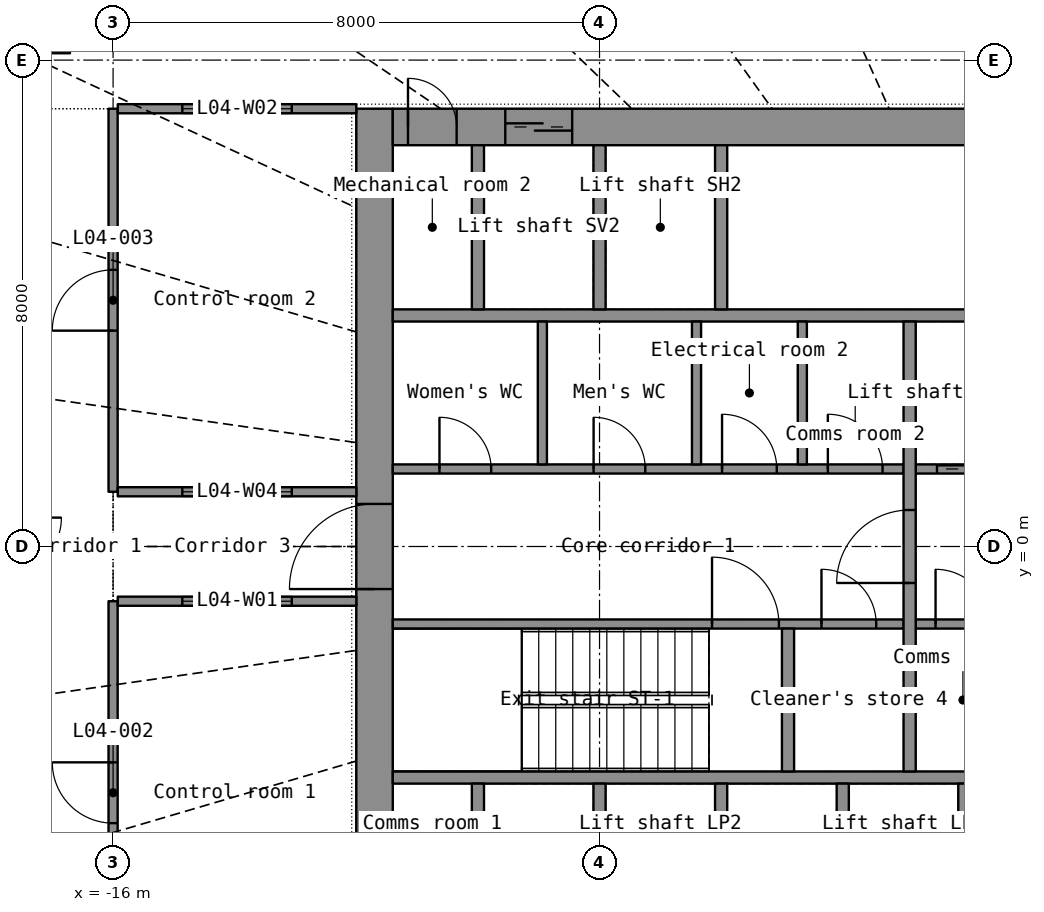
"""IFC4 building model, lengths in metres.
Left out: names, types, materials, properties, quantities, classifications, styles, units other than length and angle.
Written with IfcOpenShell. Run it as: python <this file> out.ifc"""

import sys

from ifc_helpers import new_model, si_unit, direction, frame, frame_2d, origin, place, context, subcontext, project, spatial, rectangle, extrude, element, fill, save


model = new_model("IFC4")
c1 = context("Model", 3, precision=1e-05, world=origin(), true_north=direction((0.0, 1.0)))
c2 = subcontext(c1, "Body", "Model", "MODEL_VIEW")
j1 = project(units=[si_unit("LENGTHUNIT", "METRE"), si_unit("PLANEANGLEUNIT", "RADIAN")], contexts=[c1])
p1 = place(None, origin())
s1 = spatial("IfcSite", under=j1, at=p1, CompositionType="ELEMENT")
p2 = place(p1, origin())
s2 = spatial("IfcBuilding", under=s1, at=p2, CompositionType="ELEMENT")
p3 = place(p2, frame((0.0, 0.0, 24.5)))
s3 = spatial("IfcBuildingStorey", under=s2, at=p3, CompositionType="ELEMENT", Elevation=24.5)
p4 = place(p3, frame((-11.7, -7.2, 0.0), z_axis=(0.0, 0.0, 1.0), x_axis=(0.0, 1.0, 0.0)))
e1 = element("IfcWall", 1, at=p4, inside=s3, PredefinedType="SHEAR", context=c2, shape_type="SweptSolid", body=[
    extrude(rectangle(XDim=14.4, YDim=0.6, at=frame_2d((7.2, 0.0))), origin(), (0.0, 0.0, 1.0), 3.8),
])
p5 = place(p4, frame((6.5, 0.0, 0.0)))
e2 = element("IfcOpeningElement", 2, at=p5, cuts=e1, PredefinedType="OPENING", context=c2, shape_type="SweptSolid", body=[
    extrude(rectangle(XDim=1.4, YDim=2.2, at=frame_2d((0.7, 1.1))), frame((0.0, 0.31, 0.0), z_axis=(0.0, -1.0, 0.0), x_axis=(1.0, 0.0, 0.0)), (0.0, 0.0, 1.0), 0.62),
])
p6 = place(p3, frame((-11.4, 6.9, 0.0), z_axis=(0.0, 0.0, 1.0), x_axis=(1.0, 0.0, 0.0)))
e3 = element("IfcWall", 3, at=p6, inside=s3, PredefinedType="SHEAR", context=c2, shape_type="SweptSolid", body=[
    extrude(rectangle(XDim=22.8, YDim=0.6, at=frame_2d((11.4, 0.0))), origin(), (0.0, 0.0, 1.0), 3.8),
])
p7 = place(p6, frame((1.85, 0.0, 0.0)))
e4 = element("IfcOpeningElement", 4, at=p7, cuts=e3, PredefinedType="OPENING", context=c2, shape_type="SweptSolid", body=[
    extrude(rectangle(XDim=1.1, YDim=2.2, at=frame_2d((0.55, 1.1))), frame((0.0, 0.31, 0.0), z_axis=(0.0, -1.0, 0.0), x_axis=(1.0, 0.0, 0.0)), (0.0, 0.0, 1.0), 0.62),
])
p8 = place(p6, frame((9.95, 0.0, 0.0)))
e5 = element("IfcOpeningElement", 5, at=p8, cuts=e3, PredefinedType="OPENING", context=c2, shape_type="SweptSolid", body=[
    extrude(rectangle(XDim=0.9, YDim=2.1, at=frame_2d((0.45, 1.05))), frame((0.0, 0.31, 0.0), z_axis=(0.0, -1.0, 0.0), x_axis=(1.0, 0.0, 0.0)), (0.0, 0.0, 1.0), 0.62),
])
p9 = place(p6, frame((17.95, 0.0, 0.0)))
e6 = element("IfcOpeningElement", 6, at=p9, cuts=e3, PredefinedType="OPENING", context=c2, shape_type="SweptSolid", body=[
    extrude(rectangle(XDim=0.9, YDim=2.1, at=frame_2d((0.45, 1.05))), frame((0.0, 0.31, 0.0), z_axis=(0.0, -1.0, 0.0), x_axis=(1.0, 0.0, 0.0)), (0.0, 0.0, 1.0), 0.62),
])
p10 = place(p6, frame((0.25, 0.0, 0.0)))
e7 = element("IfcOpeningElement", 7, at=p10, cuts=e3, PredefinedType="OPENING", context=c2, shape_type="SweptSolid", body=[
    extrude(rectangle(XDim=0.8, YDim=2.05, at=frame_2d((0.4, 1.025))), frame((0.0, 0.31, 0.0), z_axis=(0.0, -1.0, 0.0), x_axis=(1.0, 0.0, 0.0)), (0.0, 0.0, 1.0), 0.62),
])
p11 = place(p6, frame((21.75, 0.0, 0.0)))
e8 = element("IfcOpeningElement", 8, at=p11, cuts=e3, PredefinedType="OPENING", context=c2, shape_type="SweptSolid", body=[
    extrude(rectangle(XDim=0.8, YDim=2.05, at=frame_2d((0.4, 1.025))), frame((0.0, 0.31, 0.0), z_axis=(0.0, -1.0, 0.0), x_axis=(1.0, 0.0, 0.0)), (0.0, 0.0, 1.0), 0.62),
])
for number, where, z_axis, x_axis in (
    (9, (-11.4, -3.8, 0.0), (0.0, 0.0, 1.0), (1.0, 0.0, 0.0)),
    (10, (-11.4, 3.8, 0.0), (0.0, 0.0, 1.0), (1.0, 0.0, 0.0)),
):
    element("IfcWall", number, at=place(p3, frame(where, z_axis=z_axis, x_axis=x_axis)), inside=s3, PredefinedType="SHEAR", context=c2, shape_type="SweptSolid", body=[
        extrude(rectangle(XDim=22.8, YDim=0.2, at=frame_2d((11.4, 0.0))), origin(), (0.0, 0.0, 1.0), 3.8),
    ])
for number, where, z_axis, x_axis in (
    (11, (-10.0, -6.6, 0.0), (0.0, 0.0, 1.0), (0.0, 1.0, 0.0)),
    (12, (-8.0, -6.6, 0.0), (0.0, 0.0, 1.0), (0.0, 1.0, 0.0)),
    (13, (-6.0, -6.6, 0.0), (0.0, 0.0, 1.0), (0.0, 1.0, 0.0)),
    (14, (-4.0, -6.6, 0.0), (0.0, 0.0, 1.0), (0.0, 1.0, 0.0)),
    (15, (-2.0, -6.6, 0.0), (0.0, 0.0, 1.0), (0.0, 1.0, 0.0)),
    (16, (-10.0, 3.9, 0.0), (0.0, 0.0, 1.0), (0.0, 1.0, 0.0)),
    (17, (-8.0, 3.9, 0.0), (0.0, 0.0, 1.0), (0.0, 1.0, 0.0)),
    (18, (-6.0, 3.9, 0.0), (0.0, 0.0, 1.0), (0.0, 1.0, 0.0)),
):
    element("IfcWall", number, at=place(p3, frame(where, z_axis=z_axis, x_axis=x_axis)), inside=s3, PredefinedType="SHEAR", context=c2, shape_type="SweptSolid", body=[
        extrude(rectangle(XDim=2.7, YDim=0.2, at=frame_2d((1.35, 0.0))), origin(), (0.0, 0.0, 1.0), 3.8),
    ])
p12 = place(p3, frame((-11.4, -1.275, 0.0), z_axis=(0.0, 0.0, 1.0), x_axis=(1.0, 0.0, 0.0)))
e19 = element("IfcWall", 19, at=p12, inside=s3, PredefinedType="SHEAR", context=c2, shape_type="SweptSolid", body=[
    extrude(rectangle(XDim=8.4, YDim=0.15, at=frame_2d((4.2, 0.0))), origin(), (0.0, 0.0, 1.0), 3.8),
])
p13 = place(p12, frame((5.25, 0.0, 0.0)))
e20 = element("IfcOpeningElement", 20, at=p13, cuts=e19, PredefinedType="OPENING", context=c2, shape_type="SweptSolid", body=[
    extrude(rectangle(XDim=1.1, YDim=2.15, at=frame_2d((0.55, 1.075))), frame((0.0, 0.085, 0.0), z_axis=(0.0, -1.0, 0.0), x_axis=(1.0, 0.0, 0.0)), (0.0, 0.0, 1.0), 0.17),
])
p14 = place(p12, frame((7.05, 0.0, 0.0)))
e21 = element("IfcOpeningElement", 21, at=p14, cuts=e19, PredefinedType="OPENING", context=c2, shape_type="SweptSolid", body=[
    extrude(rectangle(XDim=0.9, YDim=2.1, at=frame_2d((0.45, 1.05))), frame((0.0, 0.085, 0.0), z_axis=(0.0, -1.0, 0.0), x_axis=(1.0, 0.0, 0.0)), (0.0, 0.0, 1.0), 0.17),
])
p15 = place(p3, frame((-2.8, -1.275, 0.0), z_axis=(0.0, 0.0, 1.0), x_axis=(1.0, 0.0, 0.0)))
e22 = element("IfcWall", 22, at=p15, inside=s3, PredefinedType="SHEAR", context=c2, shape_type="SweptSolid", body=[
    extrude(rectangle(XDim=5.6, YDim=0.15, at=frame_2d((2.8, 0.0))), origin(), (0.0, 0.0, 1.0), 3.8),
])
p16 = place(p15, frame((4.15, 0.0, 0.0)))
e23 = element("IfcOpeningElement", 23, at=p16, cuts=e22, PredefinedType="OPENING", context=c2, shape_type="SweptSolid", body=[
    extrude(rectangle(XDim=1.1, YDim=2.2, at=frame_2d((0.55, 1.1))), frame((0.0, 0.085, 0.0), z_axis=(0.0, -1.0, 0.0), x_axis=(1.0, 0.0, 0.0)), (0.0, 0.0, 1.0), 0.17),
])
p17 = place(p15, frame((0.326, 0.0, 0.0)))
e24 = element("IfcOpeningElement", 24, at=p17, cuts=e22, PredefinedType="OPENING", context=c2, shape_type="SweptSolid", body=[
    extrude(rectangle(XDim=0.9, YDim=2.1, at=frame_2d((0.45, 1.05))), frame((0.0, 0.085, 0.0), z_axis=(0.0, -1.0, 0.0), x_axis=(1.0, 0.0, 0.0)), (0.0, 0.0, 1.0), 0.17),
])
p18 = place(p15, frame((2.201, 0.0, 0.0)))
e25 = element("IfcOpeningElement", 25, at=p18, cuts=e22, PredefinedType="OPENING", context=c2, shape_type="SweptSolid", body=[
    extrude(rectangle(XDim=0.9, YDim=2.1, at=frame_2d((0.45, 1.05))), frame((0.0, 0.085, 0.0), z_axis=(0.0, -1.0, 0.0), x_axis=(1.0, 0.0, 0.0)), (0.0, 0.0, 1.0), 0.17),
])
p19 = place(p3, frame((-11.4, 1.275, 0.0), z_axis=(0.0, 0.0, 1.0), x_axis=(1.0, 0.0, 0.0)))
e26 = element("IfcWall", 26, at=p19, inside=s3, PredefinedType="PARTITIONING", context=c2, shape_type="SweptSolid", body=[
    extrude(rectangle(XDim=8.4, YDim=0.15, at=frame_2d((4.2, 0.0))), origin(), (0.0, 0.0, 1.0), 3.8),
])
p20 = place(p19, frame((0.768, 0.0, 0.0)))
e27 = element("IfcOpeningElement", 27, at=p20, cuts=e26, PredefinedType="OPENING", context=c2, shape_type="SweptSolid", body=[
    extrude(rectangle(XDim=0.85, YDim=2.1, at=frame_2d((0.425, 1.05))), frame((0.0, 0.085, 0.0), z_axis=(0.0, -1.0, 0.0), x_axis=(1.0, 0.0, 0.0)), (0.0, 0.0, 1.0), 0.17),
])
p21 = place(p19, frame((3.302, 0.0, 0.0)))
e28 = element("IfcOpeningElement", 28, at=p21, cuts=e26, PredefinedType="OPENING", context=c2, shape_type="SweptSolid", body=[
    extrude(rectangle(XDim=0.85, YDim=2.1, at=frame_2d((0.425, 1.05))), frame((0.0, 0.085, 0.0), z_axis=(0.0, -1.0, 0.0), x_axis=(1.0, 0.0, 0.0)), (0.0, 0.0, 1.0), 0.17),
])
p22 = place(p19, frame((5.415, 0.0, 0.0)))
e29 = element("IfcOpeningElement", 29, at=p22, cuts=e26, PredefinedType="OPENING", context=c2, shape_type="SweptSolid", body=[
    extrude(rectangle(XDim=0.9, YDim=2.1, at=frame_2d((0.45, 1.05))), frame((0.0, 0.085, 0.0), z_axis=(0.0, -1.0, 0.0), x_axis=(1.0, 0.0, 0.0)), (0.0, 0.0, 1.0), 0.17),
])
p23 = place(p19, frame((7.155, 0.0, 0.0)))
e30 = element("IfcOpeningElement", 30, at=p23, cuts=e26, PredefinedType="OPENING", context=c2, shape_type="SweptSolid", body=[
    extrude(rectangle(XDim=0.9, YDim=2.1, at=frame_2d((0.45, 1.05))), frame((0.0, 0.085, 0.0), z_axis=(0.0, -1.0, 0.0), x_axis=(1.0, 0.0, 0.0)), (0.0, 0.0, 1.0), 0.17),
])
p24 = place(p3, frame((-2.8, 1.275, 0.0), z_axis=(0.0, 0.0, 1.0), x_axis=(1.0, 0.0, 0.0)))
e31 = element("IfcWall", 31, at=p24, inside=s3, PredefinedType="SHEAR", context=c2, shape_type="SweptSolid", body=[
    extrude(rectangle(XDim=5.6, YDim=0.15, at=frame_2d((2.8, 0.0))), origin(), (0.0, 0.0, 1.0), 3.8),
])
p25 = place(p24, frame((0.35, 0.0, 0.0)))
e32 = element("IfcOpeningElement", 32, at=p25, cuts=e31, PredefinedType="OPENING", context=c2, shape_type="SweptSolid", body=[
    extrude(rectangle(XDim=1.1, YDim=2.2, at=frame_2d((0.55, 1.1))), frame((0.0, 0.085, 0.0), z_axis=(0.0, -1.0, 0.0), x_axis=(1.0, 0.0, 0.0)), (0.0, 0.0, 1.0), 0.17),
])
p26 = place(p24, frame((2.499, 0.0, 0.0)))
e33 = element("IfcOpeningElement", 33, at=p26, cuts=e31, PredefinedType="OPENING", context=c2, shape_type="SweptSolid", body=[
    extrude(rectangle(XDim=0.9, YDim=2.1, at=frame_2d((0.45, 1.05))), frame((0.0, 0.085, 0.0), z_axis=(0.0, -1.0, 0.0), x_axis=(1.0, 0.0, 0.0)), (0.0, 0.0, 1.0), 0.17),
])
p27 = place(p24, frame((4.374, 0.0, 0.0)))
e34 = element("IfcOpeningElement", 34, at=p27, cuts=e31, PredefinedType="OPENING", context=c2, shape_type="SweptSolid", body=[
    extrude(rectangle(XDim=0.9, YDim=2.1, at=frame_2d((0.45, 1.05))), frame((0.0, 0.085, 0.0), z_axis=(0.0, -1.0, 0.0), x_axis=(1.0, 0.0, 0.0)), (0.0, 0.0, 1.0), 0.17),
])
p28 = place(p3, frame((-2.9, -3.7, 0.0), z_axis=(0.0, 0.0, 1.0), x_axis=(0.0, 1.0, 0.0)))
e35 = element("IfcWall", 35, at=p28, inside=s3, PredefinedType="SHEAR", context=c2, shape_type="SweptSolid", body=[
    extrude(rectangle(XDim=7.4, YDim=0.2, at=frame_2d((3.7, 0.0))), origin(), (0.0, 0.0, 1.0), 3.8),
])
p29 = place(p28, frame((3.1, 0.0, 0.0)))
e36 = element("IfcOpeningElement", 36, at=p29, cuts=e35, PredefinedType="OPENING", context=c2, shape_type="SweptSolid", body=[
    extrude(rectangle(XDim=1.2, YDim=2.2, at=frame_2d((0.6, 1.1))), frame((0.0, 0.11, 0.0), z_axis=(0.0, -1.0, 0.0), x_axis=(1.0, 0.0, 0.0)), (0.0, 0.0, 1.0), 0.22),
])
p30 = place(p3, frame((-4.9, -3.7, 0.0), z_axis=(0.0, 0.0, 1.0), x_axis=(0.0, 1.0, 0.0)))
e37 = element("IfcWall", 37, at=p30, inside=s3, PredefinedType="SHEAR", context=c2, shape_type="SweptSolid", body=[
    extrude(rectangle(XDim=2.35, YDim=0.2, at=frame_2d((1.175, 0.0))), origin(), (0.0, 0.0, 1.0), 3.8),
])
for number, where, z_axis, x_axis in (
    (38, (-8.94, 1.35, 0.0), (0.0, 0.0, 1.0), (0.0, 1.0, 0.0)),
    (39, (-6.405, 1.35, 0.0), (0.0, 0.0, 1.0), (0.0, 1.0, 0.0)),
    (40, (-4.665, 1.35, 0.0), (0.0, 0.0, 1.0), (0.0, 1.0, 0.0)),
):
    element("IfcWall", number, at=place(p3, frame(where, z_axis=z_axis, x_axis=x_axis)), inside=s3, PredefinedType="PARTITIONING", context=c2, shape_type="SweptSolid", body=[
        extrude(rectangle(XDim=2.35, YDim=0.15, at=frame_2d((1.175, 0.0))), origin(), (0.0, 0.0, 1.0), 3.8),
    ])
p31 = place(p3, frame((-16.0, -7.2, 0.0), z_axis=(0.0, 0.0, 1.0), x_axis=(0.0, 1.0, 0.0)))
e41 = element("IfcWall", 41, at=p31, inside=s3, PredefinedType="PARTITIONING", context=c2, shape_type="SweptSolid", body=[
    extrude(rectangle(XDim=6.3, YDim=0.15, at=frame_2d((3.15, 0.0))), origin(), (0.0, 0.0, 1.0), 2.8),
])
p32 = place(p31, frame((2.65, 0.0, 0.0)))
e42 = element("IfcOpeningElement", 42, at=p32, cuts=e41, PredefinedType="OPENING", context=c2, shape_type="SweptSolid", body=[
    extrude(rectangle(XDim=1.0, YDim=2.2, at=frame_2d((0.5, 1.1))), frame((0.0, 0.085, 0.0), z_axis=(0.0, -1.0, 0.0), x_axis=(1.0, 0.0, 0.0)), (0.0, 0.0, 1.0), 0.17),
])
p33 = place(p3, frame((-16.0, 0.9, 0.0), z_axis=(0.0, 0.0, 1.0), x_axis=(0.0, 1.0, 0.0)))
e43 = element("IfcWall", 43, at=p33, inside=s3, PredefinedType="PARTITIONING", context=c2, shape_type="SweptSolid", body=[
    extrude(rectangle(XDim=6.3, YDim=0.15, at=frame_2d((3.15, 0.0))), origin(), (0.0, 0.0, 1.0), 2.8),
])
p34 = place(p33, frame((2.65, 0.0, 0.0)))
e44 = element("IfcOpeningElement", 44, at=p34, cuts=e43, PredefinedType="OPENING", context=c2, shape_type="SweptSolid", body=[
    extrude(rectangle(XDim=1.0, YDim=2.2, at=frame_2d((0.5, 1.1))), frame((0.0, 0.085, 0.0), z_axis=(0.0, -1.0, 0.0), x_axis=(1.0, 0.0, 0.0)), (0.0, 0.0, 1.0), 0.17),
])
p35 = place(p3, frame((-15.923, -0.9, 0.0), z_axis=(0.0, 0.0, 1.0), x_axis=(1.0, 0.0, 0.0)))
e45 = element("IfcWall", 45, at=p35, inside=s3, PredefinedType="PARTITIONING", context=c2, shape_type="SweptSolid", body=[
    extrude(rectangle(XDim=3.923, YDim=0.15, at=frame_2d((1.961, 0.0))), origin(), (0.0, 0.0, 1.0), 2.8),
])
p36 = place(p35, frame((1.062, 0.0, 1.0)))
e46 = element("IfcOpeningElement", 46, at=p36, cuts=e45, PredefinedType="OPENING", context=c2, shape_type="SweptSolid", body=[
    extrude(rectangle(XDim=1.8, YDim=1.2, at=frame_2d((0.9, 0.6))), frame((0.0, 0.085, 0.0), z_axis=(0.0, -1.0, 0.0), x_axis=(1.0, 0.0, 0.0)), (0.0, 0.0, 1.0), 0.17),
])
p37 = place(p3, frame((-15.923, 7.2, 0.0), z_axis=(0.0, 0.0, 1.0), x_axis=(1.0, 0.0, 0.0)))
e47 = element("IfcWall", 47, at=p37, inside=s3, PredefinedType="PARTITIONING", context=c2, shape_type="SweptSolid", body=[
    extrude(rectangle(XDim=3.923, YDim=0.15, at=frame_2d((1.961, 0.0))), origin(), (0.0, 0.0, 1.0), 2.8),
])
p38 = place(p37, frame((1.062, 0.0, 1.0)))
e48 = element("IfcOpeningElement", 48, at=p38, cuts=e47, PredefinedType="OPENING", context=c2, shape_type="SweptSolid", body=[
    extrude(rectangle(XDim=1.8, YDim=1.2, at=frame_2d((0.9, 0.6))), frame((0.0, 0.085, 0.0), z_axis=(0.0, -1.0, 0.0), x_axis=(1.0, 0.0, 0.0)), (0.0, 0.0, 1.0), 0.17),
])
p39 = place(p3, frame((-12.0, 0.9, 0.0), z_axis=(0.0, 0.0, 1.0), x_axis=(-1.0, 0.0, 0.0)))
e49 = element("IfcWall", 49, at=p39, inside=s3, PredefinedType="PARTITIONING", context=c2, shape_type="SweptSolid", body=[
    extrude(rectangle(XDim=3.923, YDim=0.15, at=frame_2d((1.961, 0.0))), origin(), (0.0, 0.0, 1.0), 2.8),
])
p40 = place(p39, frame((1.062, 0.0, 1.0)))
e50 = element("IfcOpeningElement", 50, at=p40, cuts=e49, PredefinedType="OPENING", context=c2, shape_type="SweptSolid", body=[
    extrude(rectangle(XDim=1.8, YDim=1.2, at=frame_2d((0.9, 0.6))), frame((0.0, 0.085, 0.0), z_axis=(0.0, -1.0, 0.0), x_axis=(1.0, 0.0, 0.0)), (0.0, 0.0, 1.0), 0.17),
])
p41 = place(p7, origin())
e51 = element("IfcDoor", 51, at=p41, inside=s3, OperationType="DOUBLE_DOOR_SLIDING", PredefinedType="DOOR", context=c2, shape_type="SweptSolid", body=[
    extrude(rectangle(XDim=1.1, YDim=2.2, at=frame_2d((0.55, 1.1))), frame((0.0, 0.025, 0.0), z_axis=(0.0, -1.0, 0.0), x_axis=(1.0, 0.0, 0.0)), (0.0, 0.0, 1.0), 0.05),
])
fill(e4, e51)
p42 = place(p10, origin())
e52 = element("IfcDoor", 52, at=p42, inside=s3, OperationType="SINGLE_SWING_LEFT", PredefinedType="DOOR", context=c2, shape_type="SweptSolid", body=[
    extrude(rectangle(XDim=0.8, YDim=2.05, at=frame_2d((0.4, 1.025))), frame((0.0, 0.025, 0.0), z_axis=(0.0, -1.0, 0.0), x_axis=(1.0, 0.0, 0.0)), (0.0, 0.0, 1.0), 0.05),
])
fill(e7, e52)
p43 = place(p5, origin())
e53 = element("IfcDoor", 53, at=p43, inside=s3, OperationType="DOUBLE_DOOR_SINGLE_SWING", PredefinedType="DOOR", context=c2, shape_type="SweptSolid", body=[
    extrude(rectangle(XDim=1.4, YDim=2.2, at=frame_2d((0.7, 1.1))), frame((0.0, 0.025, 0.0), z_axis=(0.0, -1.0, 0.0), x_axis=(1.0, 0.0, 0.0)), (0.0, 0.0, 1.0), 0.05),
])
fill(e2, e53)
p44 = place(p29, origin())
e54 = element("IfcDoor", 54, at=p44, inside=s3, OperationType="SINGLE_SWING_LEFT", PredefinedType="DOOR", context=c2, shape_type="SweptSolid", body=[
    extrude(rectangle(XDim=1.2, YDim=2.2, at=frame_2d((0.6, 1.1))), frame((0.0, 0.025, 0.0), z_axis=(0.0, -1.0, 0.0), x_axis=(1.0, 0.0, 0.0)), (0.0, 0.0, 1.0), 0.05),
])
fill(e36, e54)
p45 = place(p25, origin())
e55 = element("IfcDoor", 55, at=p45, inside=s3, OperationType="DOUBLE_DOOR_SLIDING", PredefinedType="DOOR", context=c2, shape_type="SweptSolid", body=[
    extrude(rectangle(XDim=1.1, YDim=2.2, at=frame_2d((0.55, 1.1))), frame((0.0, 0.025, 0.0), z_axis=(0.0, -1.0, 0.0), x_axis=(1.0, 0.0, 0.0)), (0.0, 0.0, 1.0), 0.05),
])
fill(e32, e55)
p46 = place(p13, origin())
e56 = element("IfcDoor", 56, at=p46, inside=s3, OperationType="SINGLE_SWING_LEFT", PredefinedType="DOOR", context=c2, shape_type="SweptSolid", body=[
    extrude(rectangle(XDim=1.1, YDim=2.15, at=frame_2d((0.55, 1.075))), frame((0.0, 0.025, 0.0), z_axis=(0.0, -1.0, 0.0), x_axis=(1.0, 0.0, 0.0)), (0.0, 0.0, 1.0), 0.05),
])
fill(e20, e56)
p47 = place(p20, origin())
e57 = element("IfcDoor", 57, at=p47, inside=s3, OperationType="SINGLE_SWING_LEFT", PredefinedType="DOOR", context=c2, shape_type="SweptSolid", body=[
    extrude(rectangle(XDim=0.85, YDim=2.1, at=frame_2d((0.425, 1.05))), frame((0.0, 0.025, 0.0), z_axis=(0.0, -1.0, 0.0), x_axis=(1.0, 0.0, 0.0)), (0.0, 0.0, 1.0), 0.05),
])
fill(e27, e57)
p48 = place(p21, origin())
e58 = element("IfcDoor", 58, at=p48, inside=s3, OperationType="SINGLE_SWING_LEFT", PredefinedType="DOOR", context=c2, shape_type="SweptSolid", body=[
    extrude(rectangle(XDim=0.85, YDim=2.1, at=frame_2d((0.425, 1.05))), frame((0.0, 0.025, 0.0), z_axis=(0.0, -1.0, 0.0), x_axis=(1.0, 0.0, 0.0)), (0.0, 0.0, 1.0), 0.05),
])
fill(e28, e58)
p49 = place(p22, origin())
e59 = element("IfcDoor", 59, at=p49, inside=s3, OperationType="SINGLE_SWING_LEFT", PredefinedType="DOOR", context=c2, shape_type="SweptSolid", body=[
    extrude(rectangle(XDim=0.9, YDim=2.1, at=frame_2d((0.45, 1.05))), frame((0.0, 0.025, 0.0), z_axis=(0.0, -1.0, 0.0), x_axis=(1.0, 0.0, 0.0)), (0.0, 0.0, 1.0), 0.05),
])
fill(e29, e59)
p50 = place(p23, origin())
e60 = element("IfcDoor", 60, at=p50, inside=s3, OperationType="SINGLE_SWING_LEFT", PredefinedType="DOOR", context=c2, shape_type="SweptSolid", body=[
    extrude(rectangle(XDim=0.9, YDim=2.1, at=frame_2d((0.45, 1.05))), frame((0.0, 0.025, 0.0), z_axis=(0.0, -1.0, 0.0), x_axis=(1.0, 0.0, 0.0)), (0.0, 0.0, 1.0), 0.05),
])
fill(e30, e60)
p51 = place(p17, origin())
e61 = element("IfcDoor", 61, at=p51, inside=s3, OperationType="SINGLE_SWING_LEFT", PredefinedType="DOOR", context=c2, shape_type="SweptSolid", body=[
    extrude(rectangle(XDim=0.9, YDim=2.1, at=frame_2d((0.45, 1.05))), frame((0.0, 0.025, 0.0), z_axis=(0.0, -1.0, 0.0), x_axis=(1.0, 0.0, 0.0)), (0.0, 0.0, 1.0), 0.05),
])
fill(e24, e61)
p52 = place(p14, origin())
e62 = element("IfcDoor", 62, at=p52, inside=s3, OperationType="SINGLE_SWING_LEFT", PredefinedType="DOOR", context=c2, shape_type="SweptSolid", body=[
    extrude(rectangle(XDim=0.9, YDim=2.1, at=frame_2d((0.45, 1.05))), frame((0.0, 0.025, 0.0), z_axis=(0.0, -1.0, 0.0), x_axis=(1.0, 0.0, 0.0)), (0.0, 0.0, 1.0), 0.05),
])
fill(e21, e62)
p53 = place(p32, origin())
e63 = element("IfcDoor", 63, at=p53, inside=s3, OperationType="SINGLE_SWING_RIGHT", PredefinedType="DOOR", context=c2, shape_type="SweptSolid", body=[
    extrude(rectangle(XDim=1.0, YDim=2.2, at=frame_2d((0.5, 1.1))), frame((0.0, 0.025, 0.0), z_axis=(0.0, -1.0, 0.0), x_axis=(1.0, 0.0, 0.0)), (0.0, 0.0, 1.0), 0.05),
])
fill(e42, e63)
p54 = place(p34, origin())
e64 = element("IfcDoor", 64, at=p54, inside=s3, OperationType="SINGLE_SWING_LEFT", PredefinedType="DOOR", context=c2, shape_type="SweptSolid", body=[
    extrude(rectangle(XDim=1.0, YDim=2.2, at=frame_2d((0.5, 1.1))), frame((0.0, 0.025, 0.0), z_axis=(0.0, -1.0, 0.0), x_axis=(1.0, 0.0, 0.0)), (0.0, 0.0, 1.0), 0.05),
])
fill(e44, e64)
p55 = place(p36, origin())
e65 = element("IfcWindow", 65, at=p55, inside=s3, PartitioningType="SINGLE_PANEL", PredefinedType="WINDOW", context=c2, shape_type="SweptSolid", body=[
    extrude(rectangle(XDim=1.8, YDim=1.2, at=frame_2d((0.9, 0.6))), frame((0.0, 0.03, 0.0), z_axis=(0.0, -1.0, 0.0), x_axis=(1.0, 0.0, 0.0)), (0.0, 0.0, 1.0), 0.06),
])
fill(e46, e65)
p56 = place(p38, origin())
e66 = element("IfcWindow", 66, at=p56, inside=s3, PartitioningType="SINGLE_PANEL", PredefinedType="WINDOW", context=c2, shape_type="SweptSolid", body=[
    extrude(rectangle(XDim=1.8, YDim=1.2, at=frame_2d((0.9, 0.6))), frame((0.0, 0.03, 0.0), z_axis=(0.0, -1.0, 0.0), x_axis=(1.0, 0.0, 0.0)), (0.0, 0.0, 1.0), 0.06),
])
fill(e48, e66)
p57 = place(p40, origin())
e67 = element("IfcWindow", 67, at=p57, inside=s3, PartitioningType="SINGLE_PANEL", PredefinedType="WINDOW", context=c2, shape_type="SweptSolid", body=[
    extrude(rectangle(XDim=1.8, YDim=1.2, at=frame_2d((0.9, 0.6))), frame((0.0, 0.03, 0.0), z_axis=(0.0, -1.0, 0.0), x_axis=(1.0, 0.0, 0.0)), (0.0, 0.0, 1.0), 0.06),
])
fill(e50, e67)
save(model, sys.argv[1])
